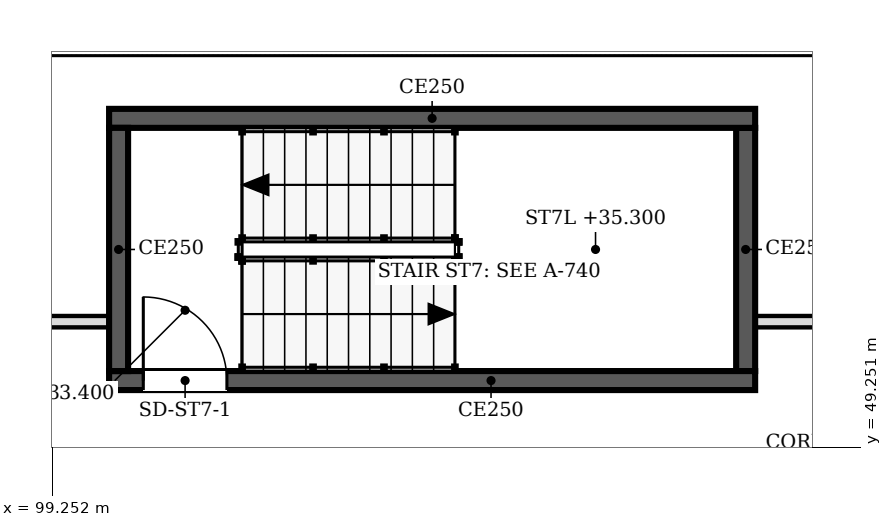
"""IFC4 building model, lengths in metres.
Left out: names, types, materials, properties, quantities, classifications, styles, units other than length and angle.
Written with IfcOpenShell. Run it as: python <this file> out.ifc"""

import sys

from ifc_helpers import new_model, si_unit, direction, frame, frame_2d, origin, place, context, subcontext, project, spatial, polyline, rectangle, outline, extrude, faceted_brep, source, transform, mapped, element, fill, save


model = new_model("IFC4")
c1 = context("Model", 3, precision=1e-05, world=origin(), true_north=direction((0.0, 1.0)))
c2 = subcontext(c1, "Body", "Model", "MODEL_VIEW")
j1 = project(units=[si_unit("LENGTHUNIT", "METRE"), si_unit("PLANEANGLEUNIT", "RADIAN")], contexts=[c1])
p1 = place(None, origin())
s1 = spatial("IfcSite", under=j1, at=p1, CompositionType="ELEMENT")
p2 = place(p1, origin())
s2 = spatial("IfcBuilding", under=s1, at=p2, CompositionType="ELEMENT")
p3 = place(p2, frame((0.0, 0.0, 33.4)))
s3 = spatial("IfcBuildingStorey", under=s2, at=p3, CompositionType="ELEMENT", Elevation=33.4)
m1 = source(origin(), c2, "Body", "SweptSolid", [
    extrude(outline(polyline([(3.05, 0.0), (6.1, 3.8), (3.05, 7.6), (0.0, 3.8), (3.05, 0.0)])), frame((0.0, 0.25, 0.0), z_axis=(0.0, -1.0, 0.0), x_axis=(1.0, 0.0, 0.0)), (0.0, 0.0, 1.0), 0.5),
])
p4 = place(p3, frame((112.85, 54.65, -3.8), z_axis=(0.0, 0.0, 1.0), x_axis=(-1.0, 0.0, 0.0)))
e1 = element("IfcWall", 1, at=p4, inside=s3, PredefinedType="SOLIDWALL", context=c2, shape_type="MappedRepresentation", body=[
    mapped(m1, transform((0.0, 0.0, 0.0), scale=1.0)),
])
m2 = source(origin(), c2, "Body", "SweptSolid", [
    extrude(outline(polyline([(3.05, 0.399), (5.78, 3.8), (3.05, 7.2), (0.321, 3.8), (3.05, 0.399)])), frame((0.0, 0.26, 0.0), z_axis=(0.0, -1.0, 0.0), x_axis=(1.0, 0.0, 0.0)), (0.0, 0.0, 1.0), 0.52),
])
p5 = place(p4, origin())
e2 = element("IfcOpeningElement", 2, at=p5, cuts=e1, PredefinedType="OPENING", context=c2, shape_type="MappedRepresentation", body=[
    mapped(m2, transform((0.0, 0.0, 0.0), scale=1.0)),
])
p6 = place(p3, frame((106.75, 54.65, -3.8), z_axis=(0.0, 0.0, 1.0), x_axis=(-1.0, 0.0, 0.0)))
e3 = element("IfcWall", 3, at=p6, inside=s3, PredefinedType="SOLIDWALL", context=c2, shape_type="MappedRepresentation", body=[
    mapped(m1, transform((0.0, 0.0, 0.0), scale=1.0)),
])
p7 = place(p6, origin())
e4 = element("IfcOpeningElement", 4, at=p7, cuts=e3, PredefinedType="OPENING", context=c2, shape_type="MappedRepresentation", body=[
    mapped(m2, transform((0.0, 0.0, 0.0), scale=1.0)),
])
m3 = source(origin(), c2, "Body", "Brep", [
    faceted_brep([(3.05, -0.25, 0.0), (6.1, -0.25, 3.8), (6.1, -0.25, 3.8), (3.05, -0.25, 7.6), (0.0, -0.25, 3.8), (0.0, 0.25, 3.8), (3.05, 0.25, 7.6), (6.1, 0.25, 3.8), (6.1, 0.25, 3.8), (3.05, 0.25, 0.0)], [[[0, 1, 2, 3, 4]], [[5, 6, 7, 8, 9]], [[9, 8, 1, 0]], [[7, 6, 3, 2]], [[6, 5, 4, 3]], [[5, 9, 0, 4]], [[1, 8, 7, 2]]]),
])
p8 = place(p3, frame((100.65, 54.65, -3.8), z_axis=(0.0, 0.0, 1.0), x_axis=(-1.0, 0.0, 0.0)))
e5 = element("IfcWall", 5, at=p8, inside=s3, PredefinedType="SOLIDWALL", context=c2, shape_type="MappedRepresentation", body=[
    mapped(m3, transform((0.0, 0.0, 0.0), scale=1.0)),
])
p9 = place(p8, origin())
e6 = element("IfcOpeningElement", 6, at=p9, cuts=e5, PredefinedType="OPENING", context=c2, shape_type="MappedRepresentation", body=[
    mapped(m2, transform((0.0, 0.0, 0.0), scale=1.0)),
])
p10 = place(p2, frame((0.0, 0.0, 37.2)))
s4 = spatial("IfcBuildingStorey", under=s2, at=p10, CompositionType="ELEMENT", Elevation=37.2)
m4 = source(origin(), c2, "Body", "SweptSolid", [
    extrude(outline(polyline([(3.05, 0.0), (6.1, 3.8), (3.05, 7.6), (0.0, 3.8), (3.05, 0.0)])), frame((0.0, 0.25, 0.0), z_axis=(0.0, -1.0, 0.0), x_axis=(1.0, 0.0, 0.0)), (0.0, 0.0, 1.0), 0.5),
])
p11 = place(p10, frame((109.8, 54.65, -3.8), z_axis=(0.0, 0.0, 1.0), x_axis=(-1.0, 0.0, 0.0)))
e7 = element("IfcWall", 7, at=p11, inside=s4, PredefinedType="SOLIDWALL", context=c2, shape_type="MappedRepresentation", body=[
    mapped(m4, transform((0.0, 0.0, 0.0), scale=1.0)),
])
m5 = source(origin(), c2, "Body", "SweptSolid", [
    extrude(outline(polyline([(3.05, 0.399), (5.78, 3.8), (3.05, 7.201), (0.321, 3.8), (3.05, 0.399)])), frame((0.0, 0.26, 0.0), z_axis=(0.0, -1.0, 0.0), x_axis=(1.0, 0.0, 0.0)), (0.0, 0.0, 1.0), 0.52),
])
p12 = place(p11, origin())
e8 = element("IfcOpeningElement", 8, at=p12, cuts=e7, PredefinedType="OPENING", context=c2, shape_type="MappedRepresentation", body=[
    mapped(m5, transform((0.0, 0.0, 0.0), scale=1.0)),
])
m6 = source(origin(), c2, "Body", "Brep", [
    faceted_brep([(3.05, -0.25, 0.0), (6.1, -0.25, 3.8), (6.1, -0.25, 3.8), (3.05, -0.25, 7.6), (0.0, -0.25, 3.8), (0.0, 0.25, 3.8), (3.05, 0.25, 7.6), (6.1, 0.25, 3.8), (6.1, 0.25, 3.8), (3.05, 0.25, 0.0)], [[[0, 1, 2, 3, 4]], [[5, 6, 7, 8, 9]], [[9, 8, 1, 0]], [[7, 6, 3, 2]], [[6, 5, 4, 3]], [[5, 9, 0, 4]], [[1, 8, 7, 2]]]),
])
p13 = place(p10, frame((103.7, 54.65, -3.8), z_axis=(0.0, 0.0, 1.0), x_axis=(-1.0, 0.0, 0.0)))
e9 = element("IfcWall", 9, at=p13, inside=s4, PredefinedType="SOLIDWALL", context=c2, shape_type="MappedRepresentation", body=[
    mapped(m6, transform((0.0, 0.0, 0.0), scale=1.0)),
])
p14 = place(p13, origin())
e10 = element("IfcOpeningElement", 10, at=p14, cuts=e9, PredefinedType="OPENING", context=c2, shape_type="MappedRepresentation", body=[
    mapped(m5, transform((0.0, 0.0, 0.0), scale=1.0)),
])
p15 = place(p3, frame((108.5, 50.125, 0.0), z_axis=(0.0, 0.0, 1.0), x_axis=(-1.0, 0.0, 0.0)))
e11 = element("IfcWall", 11, at=p15, inside=s3, PredefinedType="SOLIDWALL", context=c2, shape_type="SweptSolid", body=[
    extrude(rectangle(XDim=8.5, YDim=0.25, at=frame_2d((4.25, 0.0))), origin(), (0.0, 0.0, 1.0), 3.8),
])
m7 = source(origin(), c2, "Body", "SweptSolid", [
    extrude(rectangle(XDim=1.1, YDim=2.1, at=frame_2d((0.55, 1.05))), frame((0.0, 0.135, 0.0), z_axis=(0.0, -1.0, 0.0), x_axis=(1.0, 0.0, 0.0)), (0.0, 0.0, 1.0), 0.27),
])
p16 = place(p15, frame((6.95, 0.0, 0.0)))
e12 = element("IfcOpeningElement", 12, at=p16, cuts=e11, PredefinedType="OPENING", context=c2, shape_type="MappedRepresentation", body=[
    mapped(m7, transform((0.0, 0.0, 0.0), scale=1.0)),
])
p17 = place(p3, frame((100.125, 50.25, 0.0), z_axis=(0.0, 0.0, 1.0), x_axis=(0.0, 1.0, 0.0)))
e13 = element("IfcWall", 13, at=p17, inside=s3, PredefinedType="SOLIDWALL", context=c2, shape_type="SweptSolid", body=[
    extrude(rectangle(XDim=3.2, YDim=0.25, at=frame_2d((1.6, 0.0))), origin(), (0.0, 0.0, 1.0), 3.8),
])
p18 = place(p3, frame((100.0, 53.575, 0.0), z_axis=(0.0, 0.0, 1.0), x_axis=(1.0, 0.0, 0.0)))
e14 = element("IfcWall", 14, at=p18, inside=s3, PredefinedType="SOLIDWALL", context=c2, shape_type="SweptSolid", body=[
    extrude(rectangle(XDim=8.5, YDim=0.25, at=frame_2d((4.25, 0.0))), origin(), (0.0, 0.0, 1.0), 3.8),
])
p19 = place(p3, frame((108.375, 53.45, 0.0), z_axis=(0.0, 0.0, 1.0), x_axis=(0.0, -1.0, 0.0)))
e15 = element("IfcWall", 15, at=p19, inside=s3, PredefinedType="SOLIDWALL", context=c2, shape_type="SweptSolid", body=[
    extrude(rectangle(XDim=3.2, YDim=0.25, at=frame_2d((1.6, 0.0))), origin(), (0.0, 0.0, 1.0), 3.8),
])
p20 = place(p3, frame((95.576, 50.9, 0.0), z_axis=(0.0, 0.0, 1.0), x_axis=(1.0, 0.0, 0.0)))
e16 = element("IfcWall", 16, at=p20, inside=s3, PredefinedType="PARTITIONING", context=c2, shape_type="SweptSolid", body=[
    extrude(rectangle(XDim=4.424, YDim=0.15, at=frame_2d((2.212, 0.0))), origin(), (0.0, 0.0, 1.0), 3.067),
])
p21 = place(p3, frame((108.5, 50.9, 0.0), z_axis=(0.0, 0.0, 1.0), x_axis=(1.0, 0.0, 0.0)))
e17 = element("IfcWall", 17, at=p21, inside=s3, PredefinedType="PARTITIONING", context=c2, shape_type="SweptSolid", body=[
    extrude(rectangle(XDim=15.6, YDim=0.15, at=frame_2d((7.8, 0.0))), origin(), (0.0, 0.0, 1.0), 3.067),
])
m8 = source(origin(), c2, "Body", "SweptSolid", [
    extrude(rectangle(XDim=1.0, YDim=2.1, at=frame_2d((0.5, 1.05))), frame((0.0, 0.085, 0.0), z_axis=(0.0, -1.0, 0.0), x_axis=(1.0, 0.0, 0.0)), (0.0, 0.0, 1.0), 0.17),
])
p22 = place(p21, frame((7.3, 0.0, 0.0)))
e18 = element("IfcOpeningElement", 18, at=p22, cuts=e17, PredefinedType="OPENING", context=c2, shape_type="MappedRepresentation", body=[
    mapped(m8, transform((0.0, 0.0, 0.0), scale=1.0)),
])
m9 = source(origin(), c2, "Body", "SweptSolid", [
    extrude(rectangle(XDim=1.1, YDim=2.1, at=frame_2d((0.55, 1.05))), frame((0.0, 0.025, 0.0), z_axis=(0.0, -1.0, 0.0), x_axis=(1.0, 0.0, 0.0)), (0.0, 0.0, 1.0), 0.05),
])
p23 = place(p16, origin())
e19 = element("IfcDoor", 19, at=p23, inside=s3, OperationType="SINGLE_SWING_RIGHT", PredefinedType="DOOR", context=c2, shape_type="MappedRepresentation", body=[
    mapped(m9, transform((0.0, 0.0, 0.0), scale=1.0)),
])
fill(e12, e19)
save(model, sys.argv[1])
